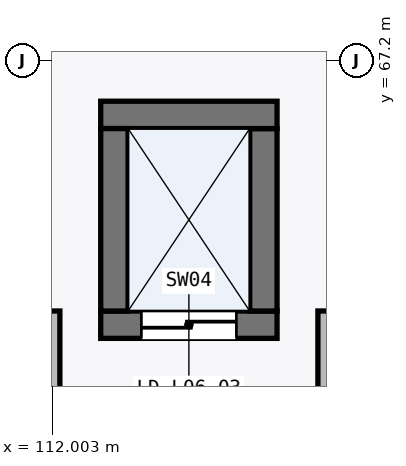
"""IFC4 building model, lengths in metres.
Left out: names, types, materials, properties, quantities, classifications, styles, units other than length and angle.
Written with IfcOpenShell. Run it as: python <this file> out.ifc"""

import sys

from ifc_helpers import new_model, si_unit, direction, frame, frame_2d, origin, place, context, subcontext, project, spatial, rectangle, extrude, element, fill, save


model = new_model("IFC4")
c1 = context("Model", 3, precision=1e-05, world=origin(), true_north=direction((0.0, 1.0)))
c2 = subcontext(c1, "Body", "Model", "MODEL_VIEW")
j1 = project(units=[si_unit("LENGTHUNIT", "METRE"), si_unit("PLANEANGLEUNIT", "RADIAN")], contexts=[c1])
p1 = place(None, origin())
s1 = spatial("IfcSite", under=j1, at=p1, CompositionType="ELEMENT")
p2 = place(p1, origin())
s2 = spatial("IfcBuilding", under=s1, at=p2, CompositionType="ELEMENT")
p3 = place(p2, frame((0.0, 0.0, 26.7)))
s3 = spatial("IfcBuildingStorey", under=s2, at=p3, CompositionType="ELEMENT", Elevation=26.7)
p4 = place(p3, frame((112.64, 63.72, 0.0), z_axis=(0.0, 0.0, 1.0), x_axis=(1.0, 0.0, 0.0)))
e1 = element("IfcWall", 1, at=p4, inside=s3, PredefinedType="SHEAR", context=c2, shape_type="SweptSolid", body=[
    extrude(rectangle(XDim=2.32, YDim=0.36, at=frame_2d((1.16, 0.0))), origin(), (0.0, 0.0, 1.0), 4.845),
])
p5 = place(p4, frame((0.535, 0.0, 0.0)))
e2 = element("IfcOpeningElement", 2, at=p5, cuts=e1, PredefinedType="OPENING", context=c2, shape_type="SweptSolid", body=[
    extrude(rectangle(XDim=1.25, YDim=2.2, at=frame_2d((0.625, 1.1))), frame((0.0, 0.19, 0.0), z_axis=(0.0, -1.0, 0.0), x_axis=(1.0, 0.0, 0.0)), (0.0, 0.0, 1.0), 0.38),
])
p6 = place(p3, frame((114.78, 63.9, 0.0), z_axis=(0.0, 0.0, 1.0), x_axis=(0.0, 1.0, 0.0)))
e3 = element("IfcWall", 3, at=p6, inside=s3, PredefinedType="SHEAR", context=c2, shape_type="SweptSolid", body=[
    extrude(rectangle(XDim=2.4, YDim=0.36, at=frame_2d((1.2, 0.0))), origin(), (0.0, 0.0, 1.0), 4.845),
])
p7 = place(p3, frame((114.96, 66.48, 0.0), z_axis=(0.0, 0.0, 1.0), x_axis=(-1.0, 0.0, 0.0)))
e4 = element("IfcWall", 4, at=p7, inside=s3, PredefinedType="SHEAR", context=c2, shape_type="SweptSolid", body=[
    extrude(rectangle(XDim=2.32, YDim=0.36, at=frame_2d((1.16, 0.0))), origin(), (0.0, 0.0, 1.0), 4.845),
])
p8 = place(p3, frame((112.82, 66.3, 0.0), z_axis=(0.0, 0.0, 1.0), x_axis=(0.0, -1.0, 0.0)))
e5 = element("IfcWall", 5, at=p8, inside=s3, PredefinedType="SHEAR", context=c2, shape_type="SweptSolid", body=[
    extrude(rectangle(XDim=2.4, YDim=0.36, at=frame_2d((1.2, 0.0))), origin(), (0.0, 0.0, 1.0), 4.845),
])
for number, where, z_axis, x_axis in (
    (6, (115.6, 59.397, 0.0), (0.0, 0.0, 1.0), (0.0, 1.0, 0.0)),
    (7, (112.0, 63.9, 0.0), (0.0, 0.0, 1.0), (0.0, -1.0, 0.0)),
):
    element("IfcWall", number, at=place(p3, frame(where, z_axis=z_axis, x_axis=x_axis)), inside=s3, PredefinedType="PARTITIONING", context=c2, shape_type="SweptSolid", body=[
        extrude(rectangle(XDim=4.502, YDim=0.205, at=frame_2d((2.251, 0.0))), origin(), (0.0, 0.0, 1.0), 4.845),
    ])
p9 = place(p5, frame((1.25, 0.0, 0.0), z_axis=(0.0, 0.0, 1.0), x_axis=(-1.0, 0.0, 0.0)))
e8 = element("IfcDoor", 8, at=p9, inside=s3, OperationType="DOUBLE_DOOR_SLIDING", PredefinedType="DOOR", context=c2, shape_type="SweptSolid", body=[
    extrude(rectangle(XDim=1.25, YDim=2.2, at=frame_2d((0.625, 1.1))), frame((0.0, 0.025, 0.0), z_axis=(0.0, -1.0, 0.0), x_axis=(1.0, 0.0, 0.0)), (0.0, 0.0, 1.0), 0.05),
])
fill(e2, e8)
save(model, sys.argv[1])
